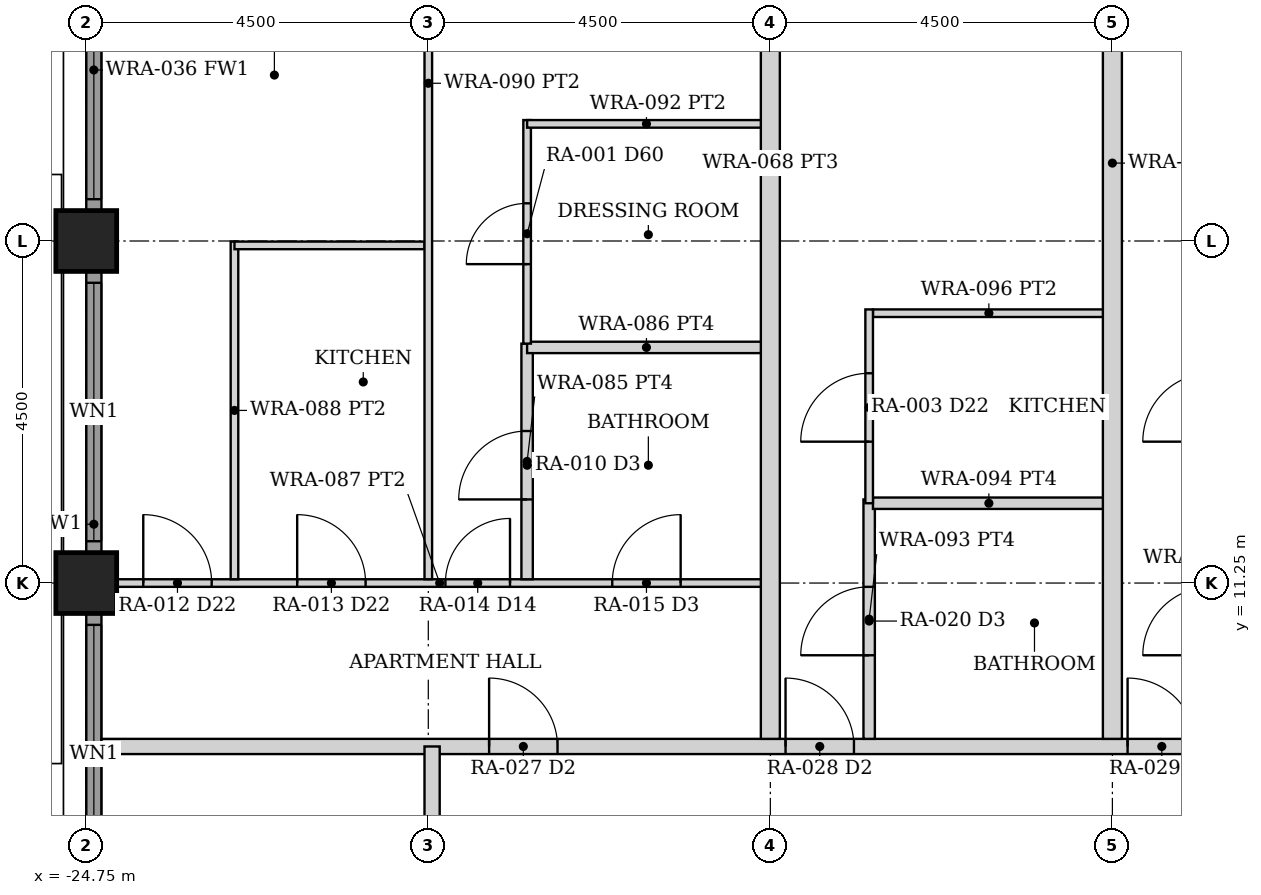
"""IFC4 building model, lengths in metres.
Left out: names, types, materials, properties, quantities, classifications, styles, units other than length and angle.
Written with IfcOpenShell. Run it as: python <this file> out.ifc"""

import sys

from ifc_helpers import new_model, si_unit, direction, frame, frame_2d, origin, origin_2d, place, context, subcontext, project, spatial, rectangle, hollow_rectangle, extrude, element, fill, save


model = new_model("IFC4")
c1 = context("Model", 3, precision=1e-05, world=origin(), true_north=direction((0.0, 1.0)))
c2 = subcontext(c1, "Body", "Model", "MODEL_VIEW")
j1 = project(units=[si_unit("LENGTHUNIT", "METRE"), si_unit("PLANEANGLEUNIT", "RADIAN")], contexts=[c1])
p1 = place(None, origin())
s1 = spatial("IfcSite", under=j1, at=p1, CompositionType="ELEMENT")
p2 = place(p1, origin())
s2 = spatial("IfcBuilding", under=s1, at=p2, CompositionType="ELEMENT")
p3 = place(p2, frame((0.0, 0.0, 26.5)))
s3 = spatial("IfcBuildingStorey", under=s2, at=p3, CompositionType="ELEMENT", Elevation=26.5)
for number, where, z_axis, x_axis in (
    (1, (-24.75, 11.25, 0.0), (0.0, 0.0, 1.0), (1.0, 0.0, 0.0)),
    (2, (-24.75, 15.75, 0.0), (0.0, 0.0, 1.0), (1.0, 0.0, 0.0)),
):
    element("IfcColumn", number, at=place(p3, frame(where, z_axis=z_axis, x_axis=x_axis)), inside=s3, PredefinedType="COLUMN", context=c2, shape_type="SweptSolid", body=[
        extrude(hollow_rectangle(XDim=0.8, YDim=0.8, WallThickness=0.08, at=origin_2d()), origin(), (0.0, 0.0, 1.0), 3.5),
    ])
p4 = place(p3, frame((-24.65, 7.155, 0.0), z_axis=(0.0, 0.0, 1.0), x_axis=(0.0, 1.0, 0.0)))
e3 = element("IfcWall", 3, at=p4, inside=s3, PredefinedType="SOLIDWALL", context=c2, shape_type="SweptSolid", body=[
    extrude(rectangle(XDim=3.69, YDim=0.2, at=frame_2d((1.845, 0.0))), origin(), (0.0, 0.0, 1.0), 2.379),
])
p5 = place(p4, frame((0.145, 0.0, 0.3)))
e4 = element("IfcOpeningElement", 4, at=p5, cuts=e3, PredefinedType="OPENING", context=c2, shape_type="SweptSolid", body=[
    extrude(rectangle(XDim=3.4, YDim=1.929, at=frame_2d((1.7, 0.964))), frame((0.0, 0.11, 0.0), z_axis=(0.0, -1.0, 0.0), x_axis=(1.0, 0.0, 0.0)), (0.0, 0.0, 1.0), 0.22),
])
p6 = place(p3, frame((-24.65, 11.655, 0.0), z_axis=(0.0, 0.0, 1.0), x_axis=(0.0, 1.0, 0.0)))
e5 = element("IfcWall", 5, at=p6, inside=s3, PredefinedType="SOLIDWALL", context=c2, shape_type="SweptSolid", body=[
    extrude(rectangle(XDim=3.69, YDim=0.2, at=frame_2d((1.845, 0.0))), origin(), (0.0, 0.0, 1.0), 2.379),
])
p7 = place(p6, frame((0.145, 0.0, 0.3)))
e6 = element("IfcOpeningElement", 6, at=p7, cuts=e5, PredefinedType="OPENING", context=c2, shape_type="SweptSolid", body=[
    extrude(rectangle(XDim=3.4, YDim=1.929, at=frame_2d((1.7, 0.964))), frame((0.0, 0.11, 0.0), z_axis=(0.0, -1.0, 0.0), x_axis=(1.0, 0.0, 0.0)), (0.0, 0.0, 1.0), 0.22),
])
p8 = place(p3, frame((-24.65, 16.155, 0.0), z_axis=(0.0, 0.0, 1.0), x_axis=(0.0, 1.0, 0.0)))
e7 = element("IfcWall", 7, at=p8, inside=s3, PredefinedType="SOLIDWALL", context=c2, shape_type="SweptSolid", body=[
    extrude(rectangle(XDim=3.69, YDim=0.2, at=frame_2d((1.845, 0.0))), origin(), (0.0, 0.0, 1.0), 2.379),
])
p9 = place(p8, frame((0.145, 0.0, 0.3)))
e8 = element("IfcOpeningElement", 8, at=p9, cuts=e7, PredefinedType="OPENING", context=c2, shape_type="SweptSolid", body=[
    extrude(rectangle(XDim=3.4, YDim=1.929, at=frame_2d((1.7, 0.964))), frame((0.0, 0.11, 0.0), z_axis=(0.0, -1.0, 0.0), x_axis=(1.0, 0.0, 0.0)), (0.0, 0.0, 1.0), 0.22),
])
p10 = place(p3, frame((-24.55, 9.1, 0.0), z_axis=(0.0, 0.0, 1.0), x_axis=(1.0, 0.0, 0.0)))
e9 = element("IfcWall", 9, at=p10, inside=s3, PredefinedType="PARTITIONING", context=c2, shape_type="SweptSolid", body=[
    extrude(rectangle(XDim=49.1, YDim=0.2, at=frame_2d((24.55, 0.0))), origin(), (0.0, 0.0, 1.0), 2.373),
])
p11 = place(p10, frame((5.1, 0.0, 0.0)))
e10 = element("IfcOpeningElement", 10, at=p11, cuts=e9, PredefinedType="OPENING", context=c2, shape_type="SweptSolid", body=[
    extrude(rectangle(XDim=0.9, YDim=2.1, at=frame_2d((0.45, 1.05))), frame((0.0, 0.11, 0.0), z_axis=(0.0, -1.0, 0.0), x_axis=(1.0, 0.0, 0.0)), (0.0, 0.0, 1.0), 0.22),
])
p12 = place(p10, frame((9.0, 0.0, 0.0)))
e11 = element("IfcOpeningElement", 11, at=p12, cuts=e9, PredefinedType="OPENING", context=c2, shape_type="SweptSolid", body=[
    extrude(rectangle(XDim=0.9, YDim=2.1, at=frame_2d((0.45, 1.05))), frame((0.0, 0.11, 0.0), z_axis=(0.0, -1.0, 0.0), x_axis=(1.0, 0.0, 0.0)), (0.0, 0.0, 1.0), 0.22),
])
p13 = place(p10, frame((13.5, 0.0, 0.0)))
e12 = element("IfcOpeningElement", 12, at=p13, cuts=e9, PredefinedType="OPENING", context=c2, shape_type="SweptSolid", body=[
    extrude(rectangle(XDim=0.9, YDim=2.1, at=frame_2d((0.45, 1.05))), frame((0.0, 0.11, 0.0), z_axis=(0.0, -1.0, 0.0), x_axis=(1.0, 0.0, 0.0)), (0.0, 0.0, 1.0), 0.22),
])
p14 = place(p10, frame((18.0, 0.0, 0.0)))
e13 = element("IfcOpeningElement", 13, at=p14, cuts=e9, PredefinedType="OPENING", context=c2, shape_type="SweptSolid", body=[
    extrude(rectangle(XDim=0.9, YDim=2.1, at=frame_2d((0.45, 1.05))), frame((0.0, 0.11, 0.0), z_axis=(0.0, -1.0, 0.0), x_axis=(1.0, 0.0, 0.0)), (0.0, 0.0, 1.0), 0.22),
])
p15 = place(p10, frame((22.5, 0.0, 0.0)))
e14 = element("IfcOpeningElement", 14, at=p15, cuts=e9, PredefinedType="OPENING", context=c2, shape_type="SweptSolid", body=[
    extrude(rectangle(XDim=0.9, YDim=2.1, at=frame_2d((0.45, 1.05))), frame((0.0, 0.11, 0.0), z_axis=(0.0, -1.0, 0.0), x_axis=(1.0, 0.0, 0.0)), (0.0, 0.0, 1.0), 0.22),
])
p16 = place(p10, frame((27.0, 0.0, 0.0)))
e15 = element("IfcOpeningElement", 15, at=p16, cuts=e9, PredefinedType="OPENING", context=c2, shape_type="SweptSolid", body=[
    extrude(rectangle(XDim=0.9, YDim=2.1, at=frame_2d((0.45, 1.05))), frame((0.0, 0.11, 0.0), z_axis=(0.0, -1.0, 0.0), x_axis=(1.0, 0.0, 0.0)), (0.0, 0.0, 1.0), 0.22),
])
p17 = place(p10, frame((31.5, 0.0, 0.0)))
e16 = element("IfcOpeningElement", 16, at=p17, cuts=e9, PredefinedType="OPENING", context=c2, shape_type="SweptSolid", body=[
    extrude(rectangle(XDim=0.9, YDim=2.1, at=frame_2d((0.45, 1.05))), frame((0.0, 0.11, 0.0), z_axis=(0.0, -1.0, 0.0), x_axis=(1.0, 0.0, 0.0)), (0.0, 0.0, 1.0), 0.22),
])
p18 = place(p10, frame((36.0, 0.0, 0.0)))
e17 = element("IfcOpeningElement", 17, at=p18, cuts=e9, PredefinedType="OPENING", context=c2, shape_type="SweptSolid", body=[
    extrude(rectangle(XDim=0.9, YDim=2.1, at=frame_2d((0.45, 1.05))), frame((0.0, 0.11, 0.0), z_axis=(0.0, -1.0, 0.0), x_axis=(1.0, 0.0, 0.0)), (0.0, 0.0, 1.0), 0.22),
])
p19 = place(p10, frame((43.1, 0.0, 0.0)))
e18 = element("IfcOpeningElement", 18, at=p19, cuts=e9, PredefinedType="OPENING", context=c2, shape_type="SweptSolid", body=[
    extrude(rectangle(XDim=0.9, YDim=2.1, at=frame_2d((0.45, 1.05))), frame((0.0, 0.11, 0.0), z_axis=(0.0, -1.0, 0.0), x_axis=(1.0, 0.0, 0.0)), (0.0, 0.0, 1.0), 0.22),
])
p20 = place(p3, frame((-20.2, -9.1, 0.0), z_axis=(0.0, 0.0, 1.0), x_axis=(0.0, 1.0, 0.0)))
e19 = element("IfcWall", 19, at=p20, inside=s3, PredefinedType="PARTITIONING", context=c2, shape_type="SweptSolid", body=[
    extrude(rectangle(XDim=18.2, YDim=0.2, at=frame_2d((9.1, 0.0))), origin(), (0.0, 0.0, 1.0), 2.373),
])
p21 = place(p20, frame((8.6, 0.0, 0.0)))
e20 = element("IfcOpeningElement", 20, at=p21, cuts=e19, PredefinedType="OPENING", context=c2, shape_type="SweptSolid", body=[
    extrude(rectangle(XDim=1.0, YDim=2.1, at=frame_2d((0.5, 1.05))), frame((0.0, 0.11, 0.0), z_axis=(0.0, -1.0, 0.0), x_axis=(1.0, 0.0, 0.0)), (0.0, 0.0, 1.0), 0.22),
])
p22 = place(p3, frame((-24.35, 11.25, 0.0), z_axis=(0.0, 0.0, 1.0), x_axis=(1.0, 0.0, 0.0)))
e21 = element("IfcWall", 21, at=p22, inside=s3, PredefinedType="PARTITIONING", context=c2, shape_type="SweptSolid", body=[
    extrude(rectangle(XDim=8.5, YDim=0.1, at=frame_2d((4.25, 0.0))), origin(), (0.0, 0.0, 1.0), 2.373),
])
p23 = place(p22, frame((2.375, 0.0, 0.0)))
e22 = element("IfcOpeningElement", 22, at=p23, cuts=e21, PredefinedType="OPENING", context=c2, shape_type="SweptSolid", body=[
    extrude(rectangle(XDim=0.9, YDim=2.1, at=frame_2d((0.45, 1.05))), frame((0.0, 0.06, 0.0), z_axis=(0.0, -1.0, 0.0), x_axis=(1.0, 0.0, 0.0)), (0.0, 0.0, 1.0), 0.12),
])
p24 = place(p22, frame((0.35, 0.0, 0.0)))
e23 = element("IfcOpeningElement", 23, at=p24, cuts=e21, PredefinedType="OPENING", context=c2, shape_type="SweptSolid", body=[
    extrude(rectangle(XDim=0.9, YDim=2.1, at=frame_2d((0.45, 1.05))), frame((0.0, 0.06, 0.0), z_axis=(0.0, -1.0, 0.0), x_axis=(1.0, 0.0, 0.0)), (0.0, 0.0, 1.0), 0.12),
])
p25 = place(p22, frame((4.325, 0.0, 0.0)))
e24 = element("IfcOpeningElement", 24, at=p25, cuts=e21, PredefinedType="OPENING", context=c2, shape_type="SweptSolid", body=[
    extrude(rectangle(XDim=0.85, YDim=2.1, at=frame_2d((0.425, 1.05))), frame((0.0, 0.06, 0.0), z_axis=(0.0, -1.0, 0.0), x_axis=(1.0, 0.0, 0.0)), (0.0, 0.0, 1.0), 0.12),
])
p26 = place(p22, frame((6.52, 0.0, 0.0)))
e25 = element("IfcOpeningElement", 25, at=p26, cuts=e21, PredefinedType="OPENING", context=c2, shape_type="SweptSolid", body=[
    extrude(rectangle(XDim=0.9, YDim=2.1, at=frame_2d((0.45, 1.05))), frame((0.0, 0.06, 0.0), z_axis=(0.0, -1.0, 0.0), x_axis=(1.0, 0.0, 0.0)), (0.0, 0.0, 1.0), 0.12),
])
p27 = place(p3, frame((-22.8, 11.3, 0.0), z_axis=(0.0, 0.0, 1.0), x_axis=(0.0, 1.0, 0.0)))
e26 = element("IfcWall", 26, at=p27, inside=s3, PredefinedType="PARTITIONING", context=c2, shape_type="SweptSolid", body=[
    extrude(rectangle(XDim=4.442, YDim=0.1, at=frame_2d((2.221, 0.0))), origin(), (0.0, 0.0, 1.0), 2.373),
])
p28 = place(p3, frame((-22.8, 15.692, 0.0), z_axis=(0.0, 0.0, 1.0), x_axis=(1.0, 0.0, 0.0)))
e27 = element("IfcWall", 27, at=p28, inside=s3, PredefinedType="PARTITIONING", context=c2, shape_type="SweptSolid", body=[
    extrude(rectangle(XDim=2.5, YDim=0.1, at=frame_2d((1.25, 0.0))), origin(), (0.0, 0.0, 1.0), 2.373),
])
p29 = place(p3, frame((-20.25, 11.3, 0.0), z_axis=(0.0, 0.0, 1.0), x_axis=(0.0, 1.0, 0.0)))
e28 = element("IfcWall", 28, at=p29, inside=s3, PredefinedType="PARTITIONING", context=c2, shape_type="SweptSolid", body=[
    extrude(rectangle(XDim=13.05, YDim=0.1, at=frame_2d((6.525, 0.0))), origin(), (0.0, 0.0, 1.0), 2.373),
])
p30 = place(p3, frame((-18.95, 11.3, 0.0), z_axis=(0.0, 0.0, 1.0), x_axis=(0.0, 1.0, 0.0)))
e29 = element("IfcWall", 29, at=p30, inside=s3, PredefinedType="PARTITIONING", context=c2, shape_type="SweptSolid", body=[
    extrude(rectangle(XDim=3.1, YDim=0.15, at=frame_2d((1.55, 0.0))), origin(), (0.0, 0.0, 1.0), 2.373),
])
p31 = place(p30, frame((1.05, 0.0, 0.0)))
e30 = element("IfcOpeningElement", 30, at=p31, cuts=e29, PredefinedType="OPENING", context=c2, shape_type="SweptSolid", body=[
    extrude(rectangle(XDim=0.9, YDim=2.1, at=frame_2d((0.45, 1.05))), frame((0.0, 0.085, 0.0), z_axis=(0.0, -1.0, 0.0), x_axis=(1.0, 0.0, 0.0)), (0.0, 0.0, 1.0), 0.17),
])
p32 = place(p3, frame((-18.95, 14.35, 0.0), z_axis=(0.0, 0.0, 1.0), x_axis=(1.0, 0.0, 0.0)))
e31 = element("IfcWall", 31, at=p32, inside=s3, PredefinedType="PARTITIONING", context=c2, shape_type="SweptSolid", body=[
    extrude(rectangle(XDim=3.14, YDim=0.15, at=frame_2d((1.57, 0.0))), origin(), (0.0, 0.0, 1.0), 2.373),
])
p33 = place(p3, frame((-18.95, 14.4, 0.0), z_axis=(0.0, 0.0, 1.0), x_axis=(0.0, 1.0, 0.0)))
e32 = element("IfcWall", 32, at=p33, inside=s3, PredefinedType="PARTITIONING", context=c2, shape_type="SweptSolid", body=[
    extrude(rectangle(XDim=2.941, YDim=0.1, at=frame_2d((1.47, 0.0))), origin(), (0.0, 0.0, 1.0), 2.373),
])
p34 = place(p33, frame((1.045, 0.0, 0.0)))
e33 = element("IfcOpeningElement", 33, at=p34, cuts=e32, PredefinedType="OPENING", context=c2, shape_type="SweptSolid", body=[
    extrude(rectangle(XDim=0.8, YDim=2.1, at=frame_2d((0.4, 1.05))), frame((0.0, 0.06, 0.0), z_axis=(0.0, -1.0, 0.0), x_axis=(1.0, 0.0, 0.0)), (0.0, 0.0, 1.0), 0.12),
])
p35 = place(p3, frame((-18.95, 17.291, 0.0), z_axis=(0.0, 0.0, 1.0), x_axis=(1.0, 0.0, 0.0)))
e34 = element("IfcWall", 34, at=p35, inside=s3, PredefinedType="PARTITIONING", context=c2, shape_type="SweptSolid", body=[
    extrude(rectangle(XDim=3.14, YDim=0.1, at=frame_2d((1.57, 0.0))), origin(), (0.0, 0.0, 1.0), 2.373),
])
p36 = place(p3, frame((-14.45, 9.2, 0.0), z_axis=(0.0, 0.0, 1.0), x_axis=(0.0, 1.0, 0.0)))
e35 = element("IfcWall", 35, at=p36, inside=s3, PredefinedType="PARTITIONING", context=c2, shape_type="SweptSolid", body=[
    extrude(rectangle(XDim=3.15, YDim=0.15, at=frame_2d((1.575, 0.0))), origin(), (0.0, 0.0, 1.0), 2.373),
])
p37 = place(p36, frame((1.1, 0.0, 0.0)))
e36 = element("IfcOpeningElement", 36, at=p37, cuts=e35, PredefinedType="OPENING", context=c2, shape_type="SweptSolid", body=[
    extrude(rectangle(XDim=0.9, YDim=2.1, at=frame_2d((0.45, 1.05))), frame((0.0, 0.085, 0.0), z_axis=(0.0, -1.0, 0.0), x_axis=(1.0, 0.0, 0.0)), (0.0, 0.0, 1.0), 0.17),
])
p38 = place(p3, frame((-14.4, 12.3, 0.0), z_axis=(0.0, 0.0, 1.0), x_axis=(1.0, 0.0, 0.0)))
e37 = element("IfcWall", 37, at=p38, inside=s3, PredefinedType="PARTITIONING", context=c2, shape_type="SweptSolid", body=[
    extrude(rectangle(XDim=3.05, YDim=0.15, at=frame_2d((1.525, 0.0))), origin(), (0.0, 0.0, 1.0), 2.373),
])
p39 = place(p3, frame((-14.4, 14.8, 0.0), z_axis=(0.0, 0.0, 1.0), x_axis=(1.0, 0.0, 0.0)))
e38 = element("IfcWall", 38, at=p39, inside=s3, PredefinedType="PARTITIONING", context=c2, shape_type="SweptSolid", body=[
    extrude(rectangle(XDim=3.05, YDim=0.1, at=frame_2d((1.525, 0.0))), origin(), (0.0, 0.0, 1.0), 2.373),
])
p40 = place(p3, frame((-14.45, 12.3, 0.0), z_axis=(0.0, 0.0, 1.0), x_axis=(0.0, 1.0, 0.0)))
e39 = element("IfcWall", 39, at=p40, inside=s3, PredefinedType="PARTITIONING", context=c2, shape_type="SweptSolid", body=[
    extrude(rectangle(XDim=2.55, YDim=0.1, at=frame_2d((1.275, 0.0))), origin(), (0.0, 0.0, 1.0), 2.373),
])
p41 = place(p40, frame((0.81, 0.0, 0.0)))
e40 = element("IfcOpeningElement", 40, at=p41, cuts=e39, PredefinedType="OPENING", context=c2, shape_type="SweptSolid", body=[
    extrude(rectangle(XDim=0.9, YDim=2.1, at=frame_2d((0.45, 1.05))), frame((0.0, 0.06, 0.0), z_axis=(0.0, -1.0, 0.0), x_axis=(1.0, 0.0, 0.0)), (0.0, 0.0, 1.0), 0.12),
])
for number, where, z_axis, x_axis in (
    (41, (-15.75, 9.2, 0.0), (0.0, 0.0, 1.0), (0.0, 1.0, 0.0)),
    (42, (-11.25, 9.2, 0.0), (0.0, 0.0, 1.0), (0.0, 1.0, 0.0)),
):
    element("IfcWall", number, at=place(p3, frame(where, z_axis=z_axis, x_axis=x_axis)), inside=s3, PredefinedType="PARTITIONING", context=c2, shape_type="SweptSolid", body=[
        extrude(rectangle(XDim=15.15, YDim=0.25, at=frame_2d((7.575, 0.0))), origin(), (0.0, 0.0, 1.0), 2.373),
    ])
p42 = place(p5, origin())
e43 = element("IfcWindow", 43, at=p42, inside=s3, PartitioningType="SINGLE_PANEL", PredefinedType="WINDOW", context=c2, shape_type="SweptSolid", body=[
    extrude(rectangle(XDim=3.4, YDim=1.929, at=frame_2d((1.7, 0.964))), frame((0.0, 0.03, 0.0), z_axis=(0.0, -1.0, 0.0), x_axis=(1.0, 0.0, 0.0)), (0.0, 0.0, 1.0), 0.06),
])
fill(e4, e43)
p43 = place(p7, origin())
e44 = element("IfcWindow", 44, at=p43, inside=s3, PartitioningType="SINGLE_PANEL", PredefinedType="WINDOW", context=c2, shape_type="SweptSolid", body=[
    extrude(rectangle(XDim=3.4, YDim=1.929, at=frame_2d((1.7, 0.964))), frame((0.0, 0.03, 0.0), z_axis=(0.0, -1.0, 0.0), x_axis=(1.0, 0.0, 0.0)), (0.0, 0.0, 1.0), 0.06),
])
fill(e6, e44)
p44 = place(p9, origin())
e45 = element("IfcWindow", 45, at=p44, inside=s3, PartitioningType="SINGLE_PANEL", PredefinedType="WINDOW", context=c2, shape_type="SweptSolid", body=[
    extrude(rectangle(XDim=3.4, YDim=1.929, at=frame_2d((1.7, 0.964))), frame((0.0, 0.03, 0.0), z_axis=(0.0, -1.0, 0.0), x_axis=(1.0, 0.0, 0.0)), (0.0, 0.0, 1.0), 0.06),
])
fill(e8, e45)
p45 = place(p11, origin())
e46 = element("IfcDoor", 46, at=p45, inside=s3, OperationType="SINGLE_SWING_LEFT", PredefinedType="DOOR", context=c2, shape_type="SweptSolid", body=[
    extrude(rectangle(XDim=0.9, YDim=2.1, at=frame_2d((0.45, 1.05))), frame((0.0, 0.025, 0.0), z_axis=(0.0, -1.0, 0.0), x_axis=(1.0, 0.0, 0.0)), (0.0, 0.0, 1.0), 0.05),
])
fill(e10, e46)
p46 = place(p23, origin())
e47 = element("IfcDoor", 47, at=p46, inside=s3, OperationType="SINGLE_SWING_LEFT", PredefinedType="DOOR", context=c2, shape_type="SweptSolid", body=[
    extrude(rectangle(XDim=0.9, YDim=2.1, at=frame_2d((0.45, 1.05))), frame((0.0, 0.025, 0.0), z_axis=(0.0, -1.0, 0.0), x_axis=(1.0, 0.0, 0.0)), (0.0, 0.0, 1.0), 0.05),
])
fill(e22, e47)
p47 = place(p24, origin())
e48 = element("IfcDoor", 48, at=p47, inside=s3, OperationType="SINGLE_SWING_LEFT", PredefinedType="DOOR", context=c2, shape_type="SweptSolid", body=[
    extrude(rectangle(XDim=0.9, YDim=2.1, at=frame_2d((0.45, 1.05))), frame((0.0, 0.025, 0.0), z_axis=(0.0, -1.0, 0.0), x_axis=(1.0, 0.0, 0.0)), (0.0, 0.0, 1.0), 0.05),
])
fill(e23, e48)
p48 = place(p25, origin())
e49 = element("IfcDoor", 49, at=p48, inside=s3, OperationType="SINGLE_SWING_RIGHT", PredefinedType="DOOR", context=c2, shape_type="SweptSolid", body=[
    extrude(rectangle(XDim=0.85, YDim=2.1, at=frame_2d((0.425, 1.05))), frame((0.0, 0.025, 0.0), z_axis=(0.0, -1.0, 0.0), x_axis=(1.0, 0.0, 0.0)), (0.0, 0.0, 1.0), 0.05),
])
fill(e24, e49)
p49 = place(p31, origin())
e50 = element("IfcDoor", 50, at=p49, inside=s3, OperationType="SINGLE_SWING_LEFT", PredefinedType="DOOR", context=c2, shape_type="SweptSolid", body=[
    extrude(rectangle(XDim=0.9, YDim=2.1, at=frame_2d((0.45, 1.05))), frame((0.0, 0.025, 0.0), z_axis=(0.0, -1.0, 0.0), x_axis=(1.0, 0.0, 0.0)), (0.0, 0.0, 1.0), 0.05),
])
fill(e30, e50)
p50 = place(p26, origin())
e51 = element("IfcDoor", 51, at=p50, inside=s3, OperationType="SINGLE_SWING_RIGHT", PredefinedType="DOOR", context=c2, shape_type="SweptSolid", body=[
    extrude(rectangle(XDim=0.9, YDim=2.1, at=frame_2d((0.45, 1.05))), frame((0.0, 0.025, 0.0), z_axis=(0.0, -1.0, 0.0), x_axis=(1.0, 0.0, 0.0)), (0.0, 0.0, 1.0), 0.05),
])
fill(e25, e51)
p51 = place(p34, origin())
e52 = element("IfcDoor", 52, at=p51, inside=s3, OperationType="SINGLE_SWING_LEFT", PredefinedType="DOOR", context=c2, shape_type="SweptSolid", body=[
    extrude(rectangle(XDim=0.8, YDim=2.1, at=frame_2d((0.4, 1.05))), frame((0.0, 0.025, 0.0), z_axis=(0.0, -1.0, 0.0), x_axis=(1.0, 0.0, 0.0)), (0.0, 0.0, 1.0), 0.05),
])
fill(e33, e52)
p52 = place(p12, origin())
e53 = element("IfcDoor", 53, at=p52, inside=s3, OperationType="SINGLE_SWING_LEFT", PredefinedType="DOOR", context=c2, shape_type="SweptSolid", body=[
    extrude(rectangle(XDim=0.9, YDim=2.1, at=frame_2d((0.45, 1.05))), frame((0.0, 0.025, 0.0), z_axis=(0.0, -1.0, 0.0), x_axis=(1.0, 0.0, 0.0)), (0.0, 0.0, 1.0), 0.05),
])
fill(e11, e53)
p53 = place(p37, origin())
e54 = element("IfcDoor", 54, at=p53, inside=s3, OperationType="SINGLE_SWING_LEFT", PredefinedType="DOOR", context=c2, shape_type="SweptSolid", body=[
    extrude(rectangle(XDim=0.9, YDim=2.1, at=frame_2d((0.45, 1.05))), frame((0.0, 0.025, 0.0), z_axis=(0.0, -1.0, 0.0), x_axis=(1.0, 0.0, 0.0)), (0.0, 0.0, 1.0), 0.05),
])
fill(e36, e54)
p54 = place(p41, origin())
e55 = element("IfcDoor", 55, at=p54, inside=s3, OperationType="SINGLE_SWING_LEFT", PredefinedType="DOOR", context=c2, shape_type="SweptSolid", body=[
    extrude(rectangle(XDim=0.9, YDim=2.1, at=frame_2d((0.45, 1.05))), frame((0.0, 0.025, 0.0), z_axis=(0.0, -1.0, 0.0), x_axis=(1.0, 0.0, 0.0)), (0.0, 0.0, 1.0), 0.05),
])
fill(e40, e55)
p55 = place(p13, origin())
e56 = element("IfcDoor", 56, at=p55, inside=s3, OperationType="SINGLE_SWING_LEFT", PredefinedType="DOOR", context=c2, shape_type="SweptSolid", body=[
    extrude(rectangle(XDim=0.9, YDim=2.1, at=frame_2d((0.45, 1.05))), frame((0.0, 0.025, 0.0), z_axis=(0.0, -1.0, 0.0), x_axis=(1.0, 0.0, 0.0)), (0.0, 0.0, 1.0), 0.05),
])
fill(e12, e56)
save(model, sys.argv[1])
